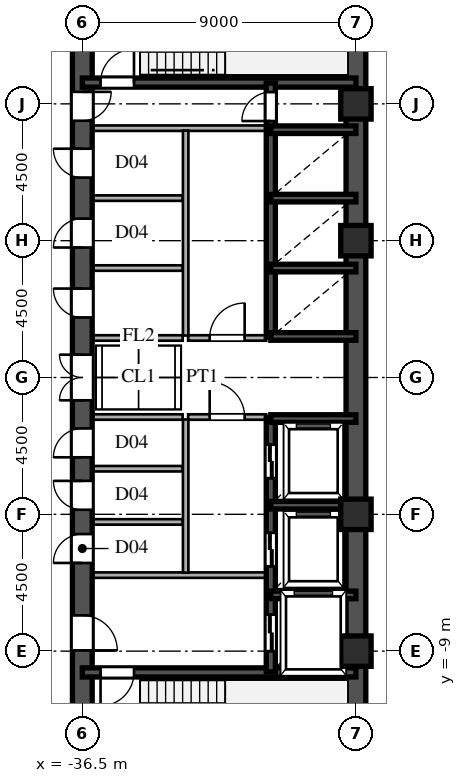
"""IFC4 building model, lengths in metres.
Left out: names, types, materials, properties, quantities, classifications, styles, units other than length and angle.
Written with IfcOpenShell. Run it as: python <this file> out.ifc"""

import sys

from ifc_helpers import new_model, si_unit, direction, frame, frame_2d, origin, origin_2d, place, context, subcontext, project, spatial, rectangle, hollow_rectangle, extrude, source, transform, mapped, element, fill, save


model = new_model("IFC4")
c1 = context("Model", 3, precision=1e-05, world=origin(), true_north=direction((0.0, 1.0)))
c2 = subcontext(c1, "Body", "Model", "MODEL_VIEW")
j1 = project(units=[si_unit("LENGTHUNIT", "METRE"), si_unit("PLANEANGLEUNIT", "RADIAN")], contexts=[c1])
p1 = place(None, origin())
s1 = spatial("IfcSite", under=j1, at=p1, CompositionType="ELEMENT")
p2 = place(p1, origin())
s2 = spatial("IfcBuilding", under=s1, at=p2, CompositionType="ELEMENT")
p3 = place(p2, frame((0.0, 0.0, 103.2)))
s3 = spatial("IfcBuildingStorey", under=s2, at=p3, CompositionType="ELEMENT", Elevation=103.2)
m1 = source(origin(), c2, "Body", "SweptSolid", [
    extrude(hollow_rectangle(XDim=1.0, YDim=1.0, WallThickness=0.042, at=origin_2d()), origin(), (0.0, 0.0, 1.0), 3.6),
])
for number, where, z_axis, x_axis in (
    (1, (-27.5, -9.0, 0.0), (0.0, 0.0, 1.0), (1.0, 0.0, 0.0)),
    (2, (-27.5, -4.5, 0.0), (0.0, 0.0, 1.0), (1.0, 0.0, 0.0)),
    (3, (-27.5, 4.5, 0.0), (0.0, 0.0, 1.0), (1.0, 0.0, 0.0)),
    (4, (-27.5, 9.0, 0.0), (0.0, 0.0, 1.0), (1.0, 0.0, 0.0)),
):
    element("IfcColumn", number, at=place(p3, frame(where, z_axis=z_axis, x_axis=x_axis)), inside=s3, PredefinedType="COLUMN", context=c2, shape_type="MappedRepresentation", body=[
        mapped(m1, transform((0.0, 0.0, 0.0), scale=1.0)),
    ])
for number, where, z_axis, x_axis in (
    (5, (-27.5, -13.5, 0.0), (0.0, 0.0, 1.0), (0.0, 1.0, 0.0)),
    (6, (-27.5, 1.3, 0.0), (0.0, 0.0, 1.0), (0.0, 1.0, 0.0)),
):
    element("IfcWall", number, at=place(p3, frame(where, z_axis=z_axis, x_axis=x_axis)), inside=s3, PredefinedType="SHEAR", context=c2, shape_type="SweptSolid", body=[
        extrude(rectangle(XDim=12.2, YDim=0.65, at=frame_2d((6.1, 0.0))), origin(), (0.0, 0.0, 1.0), 3.38),
    ])
p4 = place(p3, frame((-27.5, -1.3, 0.0), z_axis=(0.0, 0.0, 1.0), x_axis=(0.0, 1.0, 0.0)))
e7 = element("IfcWall", 7, at=p4, inside=s3, PredefinedType="SHEAR", context=c2, shape_type="SweptSolid", body=[
    extrude(rectangle(XDim=2.6, YDim=0.65, at=frame_2d((1.3, 0.0))), origin(), (0.0, 0.0, 1.0), 3.38),
])
p5 = place(p3, frame((-36.5, -13.65, 0.0), z_axis=(0.0, 0.0, 1.0), x_axis=(0.0, 1.0, 0.0)))
e8 = element("IfcWall", 8, at=p5, inside=s3, PredefinedType="SHEAR", context=c2, shape_type="SweptSolid", body=[
    extrude(rectangle(XDim=7.15, YDim=0.65, at=frame_2d((3.575, 0.0))), origin(), (0.0, 0.0, 1.0), 3.38),
])
p6 = place(p5, frame((4.675, 0.0, 0.0)))
e9 = element("IfcOpeningElement", 9, at=p6, cuts=e8, PredefinedType="OPENING", context=c2, shape_type="SweptSolid", body=[
    extrude(rectangle(XDim=1.15, YDim=2.2, at=frame_2d((0.575, 1.1))), frame((0.0, 0.335, 0.0), z_axis=(0.0, -1.0, 0.0), x_axis=(1.0, 0.0, 0.0)), (0.0, 0.0, 1.0), 0.67),
])
p7 = place(p3, frame((-36.5, -1.3, 0.0), z_axis=(0.0, 0.0, 1.0), x_axis=(0.0, 1.0, 0.0)))
e10 = element("IfcWall", 10, at=p7, inside=s3, PredefinedType="SHEAR", context=c2, shape_type="SweptSolid", body=[
    extrude(rectangle(XDim=2.6, YDim=0.65, at=frame_2d((1.3, 0.0))), origin(), (0.0, 0.0, 1.0), 3.38),
])
p8 = place(p7, frame((0.55, 0.0, 0.0)))
e11 = element("IfcOpeningElement", 11, at=p8, cuts=e10, PredefinedType="OPENING", context=c2, shape_type="SweptSolid", body=[
    extrude(rectangle(XDim=1.5, YDim=2.3, at=frame_2d((0.75, 1.15))), frame((0.0, 0.335, 0.0), z_axis=(0.0, -1.0, 0.0), x_axis=(1.0, 0.0, 0.0)), (0.0, 0.0, 1.0), 0.67),
])
p9 = place(p3, frame((-36.5, 8.2, 0.0), z_axis=(0.0, 0.0, 1.0), x_axis=(0.0, 1.0, 0.0)))
e12 = element("IfcWall", 12, at=p9, inside=s3, PredefinedType="SHEAR", context=c2, shape_type="SweptSolid", body=[
    extrude(rectangle(XDim=5.45, YDim=0.65, at=frame_2d((2.725, 0.0))), origin(), (0.0, 0.0, 1.0), 3.38),
])
p10 = place(p9, frame((0.245, 0.0, 0.0)))
e13 = element("IfcOpeningElement", 13, at=p10, cuts=e12, PredefinedType="OPENING", context=c2, shape_type="SweptSolid", body=[
    extrude(rectangle(XDim=0.95, YDim=2.15, at=frame_2d((0.475, 1.075))), frame((0.0, 0.335, 0.0), z_axis=(0.0, -1.0, 0.0), x_axis=(1.0, 0.0, 0.0)), (0.0, 0.0, 1.0), 0.67),
])
p11 = place(p3, frame((-36.5, -6.5, 0.0), z_axis=(0.0, 0.0, 1.0), x_axis=(0.0, 1.0, 0.0)))
e14 = element("IfcWall", 14, at=p11, inside=s3, PredefinedType="SHEAR", context=c2, shape_type="SweptSolid", body=[
    extrude(rectangle(XDim=1.75, YDim=0.65, at=frame_2d((0.875, 0.0))), origin(), (0.0, 0.0, 1.0), 3.38),
])
p12 = place(p11, frame((0.4, 0.0, 0.0)))
e15 = element("IfcOpeningElement", 15, at=p12, cuts=e14, PredefinedType="OPENING", context=c2, shape_type="SweptSolid", body=[
    extrude(rectangle(XDim=0.95, YDim=2.15, at=frame_2d((0.475, 1.075))), frame((0.0, 0.335, 0.0), z_axis=(0.0, -1.0, 0.0), x_axis=(1.0, 0.0, 0.0)), (0.0, 0.0, 1.0), 0.67),
])
p13 = place(p3, frame((-36.5, -4.75, 0.0), z_axis=(0.0, 0.0, 1.0), x_axis=(0.0, 1.0, 0.0)))
e16 = element("IfcWall", 16, at=p13, inside=s3, PredefinedType="SHEAR", context=c2, shape_type="SweptSolid", body=[
    extrude(rectangle(XDim=1.75, YDim=0.65, at=frame_2d((0.875, 0.0))), origin(), (0.0, 0.0, 1.0), 3.38),
])
p14 = place(p13, frame((0.4, 0.0, 0.0)))
e17 = element("IfcOpeningElement", 17, at=p14, cuts=e16, PredefinedType="OPENING", context=c2, shape_type="SweptSolid", body=[
    extrude(rectangle(XDim=0.95, YDim=2.15, at=frame_2d((0.475, 1.075))), frame((0.0, 0.335, 0.0), z_axis=(0.0, -1.0, 0.0), x_axis=(1.0, 0.0, 0.0)), (0.0, 0.0, 1.0), 0.67),
])
p15 = place(p3, frame((-36.5, -3.0, 0.0), z_axis=(0.0, 0.0, 1.0), x_axis=(0.0, 1.0, 0.0)))
e18 = element("IfcWall", 18, at=p15, inside=s3, PredefinedType="SHEAR", context=c2, shape_type="SweptSolid", body=[
    extrude(rectangle(XDim=1.7, YDim=0.65, at=frame_2d((0.85, 0.0))), origin(), (0.0, 0.0, 1.0), 3.38),
])
p16 = place(p15, frame((0.375, 0.0, 0.0)))
e19 = element("IfcOpeningElement", 19, at=p16, cuts=e18, PredefinedType="OPENING", context=c2, shape_type="SweptSolid", body=[
    extrude(rectangle(XDim=0.95, YDim=2.15, at=frame_2d((0.475, 1.075))), frame((0.0, 0.335, 0.0), z_axis=(0.0, -1.0, 0.0), x_axis=(1.0, 0.0, 0.0)), (0.0, 0.0, 1.0), 0.67),
])
p17 = place(p3, frame((-36.5, 1.3, 0.0), z_axis=(0.0, 0.0, 1.0), x_axis=(0.0, 1.0, 0.0)))
e20 = element("IfcWall", 20, at=p17, inside=s3, PredefinedType="SHEAR", context=c2, shape_type="SweptSolid", body=[
    extrude(rectangle(XDim=2.3, YDim=0.65, at=frame_2d((1.15, 0.0))), origin(), (0.0, 0.0, 1.0), 3.38),
])
p18 = place(p17, frame((0.675, 0.0, 0.0)))
e21 = element("IfcOpeningElement", 21, at=p18, cuts=e20, PredefinedType="OPENING", context=c2, shape_type="SweptSolid", body=[
    extrude(rectangle(XDim=0.95, YDim=2.15, at=frame_2d((0.475, 1.075))), frame((0.0, 0.335, 0.0), z_axis=(0.0, -1.0, 0.0), x_axis=(1.0, 0.0, 0.0)), (0.0, 0.0, 1.0), 0.67),
])
p19 = place(p3, frame((-36.5, 3.6, 0.0), z_axis=(0.0, 0.0, 1.0), x_axis=(0.0, 1.0, 0.0)))
e22 = element("IfcWall", 22, at=p19, inside=s3, PredefinedType="SHEAR", context=c2, shape_type="SweptSolid", body=[
    extrude(rectangle(XDim=2.3, YDim=0.65, at=frame_2d((1.15, 0.0))), origin(), (0.0, 0.0, 1.0), 3.38),
])
p20 = place(p19, frame((0.675, 0.0, 0.0)))
e23 = element("IfcOpeningElement", 23, at=p20, cuts=e22, PredefinedType="OPENING", context=c2, shape_type="SweptSolid", body=[
    extrude(rectangle(XDim=0.95, YDim=2.15, at=frame_2d((0.475, 1.075))), frame((0.0, 0.335, 0.0), z_axis=(0.0, -1.0, 0.0), x_axis=(1.0, 0.0, 0.0)), (0.0, 0.0, 1.0), 0.67),
])
p21 = place(p3, frame((-36.5, 5.9, 0.0), z_axis=(0.0, 0.0, 1.0), x_axis=(0.0, 1.0, 0.0)))
e24 = element("IfcWall", 24, at=p21, inside=s3, PredefinedType="SHEAR", context=c2, shape_type="SweptSolid", body=[
    extrude(rectangle(XDim=2.3, YDim=0.65, at=frame_2d((1.15, 0.0))), origin(), (0.0, 0.0, 1.0), 3.38),
])
p22 = place(p21, frame((0.675, 0.0, 0.0)))
e25 = element("IfcOpeningElement", 25, at=p22, cuts=e24, PredefinedType="OPENING", context=c2, shape_type="SweptSolid", body=[
    extrude(rectangle(XDim=0.95, YDim=2.15, at=frame_2d((0.475, 1.075))), frame((0.0, 0.335, 0.0), z_axis=(0.0, -1.0, 0.0), x_axis=(1.0, 0.0, 0.0)), (0.0, 0.0, 1.0), 0.67),
])
p23 = place(p3, frame((-36.5, -9.7, 0.0), z_axis=(0.0, 0.0, 1.0), x_axis=(1.0, 0.0, 0.0)))
e26 = element("IfcWall", 26, at=p23, inside=s3, PredefinedType="SHEAR", context=c2, shape_type="SweptSolid", body=[
    extrude(rectangle(XDim=9.0, YDim=0.3, at=frame_2d((4.5, 0.0))), origin(), (0.0, 0.0, 1.0), 3.38),
])
p24 = place(p23, frame((0.6, 0.0, 0.0)))
e27 = element("IfcOpeningElement", 27, at=p24, cuts=e26, PredefinedType="OPENING", context=c2, shape_type="SweptSolid", body=[
    extrude(rectangle(XDim=1.1, YDim=2.2, at=frame_2d((0.55, 1.1))), frame((0.0, 0.16, 0.0), z_axis=(0.0, -1.0, 0.0), x_axis=(1.0, 0.0, 0.0)), (0.0, 0.0, 1.0), 0.32),
])
p25 = place(p3, frame((-36.5, 9.7, 0.0), z_axis=(0.0, 0.0, 1.0), x_axis=(1.0, 0.0, 0.0)))
e28 = element("IfcWall", 28, at=p25, inside=s3, PredefinedType="SHEAR", context=c2, shape_type="SweptSolid", body=[
    extrude(rectangle(XDim=9.0, YDim=0.3, at=frame_2d((4.5, 0.0))), origin(), (0.0, 0.0, 1.0), 3.38),
])
p26 = place(p25, frame((0.6, 0.0, 0.0)))
e29 = element("IfcOpeningElement", 29, at=p26, cuts=e28, PredefinedType="OPENING", context=c2, shape_type="SweptSolid", body=[
    extrude(rectangle(XDim=1.1, YDim=2.2, at=frame_2d((0.55, 1.1))), frame((0.0, 0.16, 0.0), z_axis=(0.0, -1.0, 0.0), x_axis=(1.0, 0.0, 0.0)), (0.0, 0.0, 1.0), 0.32),
])
for number, where, z_axis, x_axis in (
    (30, (-30.3, -7.15, 0.0), (0.0, 0.0, 1.0), (1.0, 0.0, 0.0)),
    (31, (-30.3, -4.2, 0.0), (0.0, 0.0, 1.0), (1.0, 0.0, 0.0)),
    (32, (-30.3, -1.35, 0.0), (0.0, 0.0, 1.0), (1.0, 0.0, 0.0)),
    (33, (-30.3, 1.35, 0.0), (0.0, 0.0, 1.0), (1.0, 0.0, 0.0)),
    (34, (-30.3, 3.6, 0.0), (0.0, 0.0, 1.0), (1.0, 0.0, 0.0)),
    (35, (-30.3, 5.9, 0.0), (0.0, 0.0, 1.0), (1.0, 0.0, 0.0)),
    (36, (-30.3, 8.15, 0.0), (0.0, 0.0, 1.0), (1.0, 0.0, 0.0)),
):
    element("IfcWall", number, at=place(p3, frame(where, z_axis=z_axis, x_axis=x_axis)), inside=s3, PredefinedType="SHEAR", context=c2, shape_type="SweptSolid", body=[
        extrude(rectangle(XDim=2.8, YDim=0.25, at=frame_2d((1.4, 0.0))), origin(), (0.0, 0.0, 1.0), 3.38),
    ])
p27 = place(p3, frame((-30.3, -9.68, 0.0), z_axis=(0.0, 0.0, 1.0), x_axis=(0.0, 1.0, 0.0)))
e37 = element("IfcWall", 37, at=p27, inside=s3, PredefinedType="SHEAR", context=c2, shape_type="SweptSolid", body=[
    extrude(rectangle(XDim=2.56, YDim=0.3, at=frame_2d((1.28, 0.0))), origin(), (0.0, 0.0, 1.0), 3.38),
])
p28 = place(p27, frame((0.68, 0.0, 0.0)))
e38 = element("IfcOpeningElement", 38, at=p28, cuts=e37, PredefinedType="OPENING", context=c2, shape_type="SweptSolid", body=[
    extrude(rectangle(XDim=1.2, YDim=2.25, at=frame_2d((0.6, 1.125))), frame((0.0, 0.16, 0.0), z_axis=(0.0, -1.0, 0.0), x_axis=(1.0, 0.0, 0.0)), (0.0, 0.0, 1.0), 0.32),
])
p29 = place(p3, frame((-30.3, -7.12, 0.0), z_axis=(0.0, 0.0, 1.0), x_axis=(0.0, 1.0, 0.0)))
e39 = element("IfcWall", 39, at=p29, inside=s3, PredefinedType="SHEAR", context=c2, shape_type="SweptSolid", body=[
    extrude(rectangle(XDim=2.92, YDim=0.3, at=frame_2d((1.46, 0.0))), origin(), (0.0, 0.0, 1.0), 3.38),
])
p30 = place(p29, frame((0.91, 0.0, 0.0)))
e40 = element("IfcOpeningElement", 40, at=p30, cuts=e39, PredefinedType="OPENING", context=c2, shape_type="SweptSolid", body=[
    extrude(rectangle(XDim=1.1, YDim=2.2, at=frame_2d((0.55, 1.1))), frame((0.0, 0.16, 0.0), z_axis=(0.0, -1.0, 0.0), x_axis=(1.0, 0.0, 0.0)), (0.0, 0.0, 1.0), 0.32),
])
p31 = place(p3, frame((-30.3, -4.2, 0.0), z_axis=(0.0, 0.0, 1.0), x_axis=(0.0, 1.0, 0.0)))
e41 = element("IfcWall", 41, at=p31, inside=s3, PredefinedType="SHEAR", context=c2, shape_type="SweptSolid", body=[
    extrude(rectangle(XDim=2.88, YDim=0.3, at=frame_2d((1.44, 0.0))), origin(), (0.0, 0.0, 1.0), 3.38),
])
p32 = place(p31, frame((0.89, 0.0, 0.0)))
e42 = element("IfcOpeningElement", 42, at=p32, cuts=e41, PredefinedType="OPENING", context=c2, shape_type="SweptSolid", body=[
    extrude(rectangle(XDim=1.1, YDim=2.2, at=frame_2d((0.55, 1.1))), frame((0.0, 0.16, 0.0), z_axis=(0.0, -1.0, 0.0), x_axis=(1.0, 0.0, 0.0)), (0.0, 0.0, 1.0), 0.32),
])
p33 = place(p3, frame((-30.3, 1.32, 0.0), z_axis=(0.0, 0.0, 1.0), x_axis=(0.0, 1.0, 0.0)))
e43 = element("IfcWall", 43, at=p33, inside=s3, PredefinedType="SHEAR", context=c2, shape_type="SweptSolid", body=[
    extrude(rectangle(XDim=2.28, YDim=0.3, at=frame_2d((1.14, 0.0))), origin(), (0.0, 0.0, 1.0), 3.38),
])
p34 = place(p3, frame((-30.3, 3.6, 0.0), z_axis=(0.0, 0.0, 1.0), x_axis=(0.0, 1.0, 0.0)))
e44 = element("IfcWall", 44, at=p34, inside=s3, PredefinedType="SHEAR", context=c2, shape_type="SweptSolid", body=[
    extrude(rectangle(XDim=2.3, YDim=0.3, at=frame_2d((1.15, 0.0))), origin(), (0.0, 0.0, 1.0), 3.38),
])
p35 = place(p3, frame((-30.3, 5.9, 0.0), z_axis=(0.0, 0.0, 1.0), x_axis=(0.0, 1.0, 0.0)))
e45 = element("IfcWall", 45, at=p35, inside=s3, PredefinedType="SHEAR", context=c2, shape_type="SweptSolid", body=[
    extrude(rectangle(XDim=2.25, YDim=0.3, at=frame_2d((1.125, 0.0))), origin(), (0.0, 0.0, 1.0), 3.38),
])
p36 = place(p3, frame((-30.3, 8.15, 0.0), z_axis=(0.0, 0.0, 1.0), x_axis=(0.0, 1.0, 0.0)))
e46 = element("IfcWall", 46, at=p36, inside=s3, PredefinedType="SHEAR", context=c2, shape_type="SweptSolid", body=[
    extrude(rectangle(XDim=1.53, YDim=0.3, at=frame_2d((0.765, 0.0))), origin(), (0.0, 0.0, 1.0), 3.38),
])
p37 = place(p36, frame((0.285, 0.0, 0.0)))
e47 = element("IfcOpeningElement", 47, at=p37, cuts=e46, PredefinedType="OPENING", context=c2, shape_type="SweptSolid", body=[
    extrude(rectangle(XDim=0.95, YDim=2.15, at=frame_2d((0.475, 1.075))), frame((0.0, 0.16, 0.0), z_axis=(0.0, -1.0, 0.0), x_axis=(1.0, 0.0, 0.0)), (0.0, 0.0, 1.0), 0.32),
])
for number, where, z_axis, x_axis in (
    (48, (-36.15, -6.5, 0.0), (0.0, 0.0, 1.0), (1.0, 0.0, 0.0)),
    (49, (-36.15, 8.2, 0.0), (0.0, 0.0, 1.0), (1.0, 0.0, 0.0)),
):
    element("IfcWall", number, at=place(p3, frame(where, z_axis=z_axis, x_axis=x_axis)), inside=s3, PredefinedType="PARTITIONING", context=c2, shape_type="SweptSolid", body=[
        extrude(rectangle(XDim=5.7, YDim=0.18, at=frame_2d((2.85, 0.0))), origin(), (0.0, 0.0, 1.0), 3.38),
    ])
p38 = place(p3, frame((-33.1, -6.42, 0.0), z_axis=(0.0, 0.0, 1.0), x_axis=(0.0, 1.0, 0.0)))
e50 = element("IfcWall", 50, at=p38, inside=s3, PredefinedType="PARTITIONING", context=c2, shape_type="SweptSolid", body=[
    extrude(rectangle(XDim=5.04, YDim=0.18, at=frame_2d((2.52, 0.0))), origin(), (0.0, 0.0, 1.0), 3.38),
])
p39 = place(p3, frame((-33.1, 1.38, 0.0), z_axis=(0.0, 0.0, 1.0), x_axis=(0.0, 1.0, 0.0)))
e51 = element("IfcWall", 51, at=p39, inside=s3, PredefinedType="PARTITIONING", context=c2, shape_type="SweptSolid", body=[
    extrude(rectangle(XDim=6.74, YDim=0.18, at=frame_2d((3.37, 0.0))), origin(), (0.0, 0.0, 1.0), 3.38),
])
p40 = place(p3, frame((-33.02, -1.3, 0.0), z_axis=(0.0, 0.0, 1.0), x_axis=(1.0, 0.0, 0.0)))
e52 = element("IfcWall", 52, at=p40, inside=s3, PredefinedType="PARTITIONING", context=c2, shape_type="SweptSolid", body=[
    extrude(rectangle(XDim=2.57, YDim=0.18, at=frame_2d((1.285, 0.0))), origin(), (0.0, 0.0, 1.0), 3.38),
])
p41 = place(p40, frame((0.71, 0.0, 0.0)))
e53 = element("IfcOpeningElement", 53, at=p41, cuts=e52, PredefinedType="OPENING", context=c2, shape_type="SweptSolid", body=[
    extrude(rectangle(XDim=1.15, YDim=2.2, at=frame_2d((0.575, 1.1))), frame((0.0, 0.1, 0.0), z_axis=(0.0, -1.0, 0.0), x_axis=(1.0, 0.0, 0.0)), (0.0, 0.0, 1.0), 0.2),
])
p42 = place(p3, frame((-33.02, 1.3, 0.0), z_axis=(0.0, 0.0, 1.0), x_axis=(1.0, 0.0, 0.0)))
e54 = element("IfcWall", 54, at=p42, inside=s3, PredefinedType="PARTITIONING", context=c2, shape_type="SweptSolid", body=[
    extrude(rectangle(XDim=2.57, YDim=0.18, at=frame_2d((1.285, 0.0))), origin(), (0.0, 0.0, 1.0), 3.38),
])
p43 = place(p42, frame((0.71, 0.0, 0.0)))
e55 = element("IfcOpeningElement", 55, at=p43, cuts=e54, PredefinedType="OPENING", context=c2, shape_type="SweptSolid", body=[
    extrude(rectangle(XDim=1.15, YDim=2.2, at=frame_2d((0.575, 1.1))), frame((0.0, 0.1, 0.0), z_axis=(0.0, -1.0, 0.0), x_axis=(1.0, 0.0, 0.0)), (0.0, 0.0, 1.0), 0.2),
])
for number, where, z_axis, x_axis in (
    (56, (-36.15, -1.3, 0.0), (0.0, 0.0, 1.0), (1.0, 0.0, 0.0)),
    (57, (-36.15, 1.3, 0.0), (0.0, 0.0, 1.0), (1.0, 0.0, 0.0)),
    (58, (-36.15, -4.75, 0.0), (0.0, 0.0, 1.0), (1.0, 0.0, 0.0)),
    (59, (-36.15, -3.0, 0.0), (0.0, 0.0, 1.0), (1.0, 0.0, 0.0)),
    (60, (-36.15, 3.6, 0.0), (0.0, 0.0, 1.0), (1.0, 0.0, 0.0)),
    (61, (-36.15, 5.9, 0.0), (0.0, 0.0, 1.0), (1.0, 0.0, 0.0)),
):
    element("IfcWall", number, at=place(p3, frame(where, z_axis=z_axis, x_axis=x_axis)), inside=s3, PredefinedType="PARTITIONING", context=c2, shape_type="SweptSolid", body=[
        extrude(rectangle(XDim=2.95, YDim=0.18, at=frame_2d((1.475, 0.0))), origin(), (0.0, 0.0, 1.0), 3.38),
    ])
m2 = source(origin(), c2, "Body", "SweptSolid", [
    extrude(rectangle(XDim=1.15, YDim=2.2, at=frame_2d((0.575, 1.1))), frame((0.0, 0.025, 0.0), z_axis=(0.0, -1.0, 0.0), x_axis=(1.0, 0.0, 0.0)), (0.0, 0.0, 1.0), 0.05),
])
p44 = place(p6, frame((1.15, 0.0, 0.0), z_axis=(0.0, 0.0, 1.0), x_axis=(-1.0, 0.0, 0.0)))
e62 = element("IfcDoor", 62, at=p44, inside=s3, OperationType="SINGLE_SWING_LEFT", PredefinedType="DOOR", context=c2, shape_type="MappedRepresentation", body=[
    mapped(m2, transform((0.0, 0.0, 0.0), scale=1.0)),
])
fill(e9, e62)
m3 = source(origin(), c2, "Body", "SweptSolid", [
    extrude(rectangle(XDim=1.5, YDim=2.3, at=frame_2d((0.75, 1.15))), frame((0.0, 0.025, 0.0), z_axis=(0.0, -1.0, 0.0), x_axis=(1.0, 0.0, 0.0)), (0.0, 0.0, 1.0), 0.05),
])
p45 = place(p8, origin())
e63 = element("IfcDoor", 63, at=p45, inside=s3, OperationType="DOUBLE_SWING_LEFT", PredefinedType="DOOR", context=c2, shape_type="MappedRepresentation", body=[
    mapped(m3, transform((0.0, 0.0, 0.0), scale=1.0)),
])
fill(e11, e63)
m4 = source(origin(), c2, "Body", "SweptSolid", [
    extrude(rectangle(XDim=0.95, YDim=2.15, at=frame_2d((0.475, 1.075))), frame((0.0, 0.025, 0.0), z_axis=(0.0, -1.0, 0.0), x_axis=(1.0, 0.0, 0.0)), (0.0, 0.0, 1.0), 0.05),
])
p46 = place(p10, frame((0.95, 0.0, 0.0), z_axis=(0.0, 0.0, 1.0), x_axis=(-1.0, 0.0, 0.0)))
e64 = element("IfcDoor", 64, at=p46, inside=s3, OperationType="SINGLE_SWING_RIGHT", PredefinedType="DOOR", context=c2, shape_type="MappedRepresentation", body=[
    mapped(m4, transform((0.0, 0.0, 0.0), scale=1.0)),
])
fill(e13, e64)
p47 = place(p12, origin())
e65 = element("IfcDoor", 65, at=p47, inside=s3, OperationType="SINGLE_SWING_LEFT", PredefinedType="DOOR", context=c2, shape_type="MappedRepresentation", body=[
    mapped(m4, transform((0.0, 0.0, 0.0), scale=1.0)),
])
fill(e15, e65)
p48 = place(p14, origin())
e66 = element("IfcDoor", 66, at=p48, inside=s3, OperationType="SINGLE_SWING_RIGHT", PredefinedType="DOOR", context=c2, shape_type="MappedRepresentation", body=[
    mapped(m4, transform((0.0, 0.0, 0.0), scale=1.0)),
])
fill(e17, e66)
p49 = place(p16, origin())
e67 = element("IfcDoor", 67, at=p49, inside=s3, OperationType="SINGLE_SWING_LEFT", PredefinedType="DOOR", context=c2, shape_type="MappedRepresentation", body=[
    mapped(m4, transform((0.0, 0.0, 0.0), scale=1.0)),
])
fill(e19, e67)
p50 = place(p18, origin())
e68 = element("IfcDoor", 68, at=p50, inside=s3, OperationType="SINGLE_SWING_RIGHT", PredefinedType="DOOR", context=c2, shape_type="MappedRepresentation", body=[
    mapped(m4, transform((0.0, 0.0, 0.0), scale=1.0)),
])
fill(e21, e68)
p51 = place(p20, origin())
e69 = element("IfcDoor", 69, at=p51, inside=s3, OperationType="SINGLE_SWING_LEFT", PredefinedType="DOOR", context=c2, shape_type="MappedRepresentation", body=[
    mapped(m4, transform((0.0, 0.0, 0.0), scale=1.0)),
])
fill(e23, e69)
p52 = place(p22, origin())
e70 = element("IfcDoor", 70, at=p52, inside=s3, OperationType="SINGLE_SWING_RIGHT", PredefinedType="DOOR", context=c2, shape_type="MappedRepresentation", body=[
    mapped(m4, transform((0.0, 0.0, 0.0), scale=1.0)),
])
fill(e25, e70)
m5 = source(origin(), c2, "Body", "SweptSolid", [
    extrude(rectangle(XDim=1.1, YDim=2.2, at=frame_2d((0.55, 1.1))), frame((0.0, 0.025, 0.0), z_axis=(0.0, -1.0, 0.0), x_axis=(1.0, 0.0, 0.0)), (0.0, 0.0, 1.0), 0.05),
])
p53 = place(p24, frame((1.1, 0.0, 0.0), z_axis=(0.0, 0.0, 1.0), x_axis=(-1.0, 0.0, 0.0)))
e71 = element("IfcDoor", 71, at=p53, inside=s3, OperationType="SINGLE_SWING_LEFT", PredefinedType="DOOR", context=c2, shape_type="MappedRepresentation", body=[
    mapped(m5, transform((0.0, 0.0, 0.0), scale=1.0)),
])
fill(e27, e71)
p54 = place(p26, origin())
e72 = element("IfcDoor", 72, at=p54, inside=s3, OperationType="SINGLE_SWING_RIGHT", PredefinedType="DOOR", context=c2, shape_type="MappedRepresentation", body=[
    mapped(m5, transform((0.0, 0.0, 0.0), scale=1.0)),
])
fill(e29, e72)
m6 = source(origin(), c2, "Body", "SweptSolid", [
    extrude(rectangle(XDim=1.2, YDim=2.25, at=frame_2d((0.6, 1.125))), frame((0.0, 0.025, 0.0), z_axis=(0.0, -1.0, 0.0), x_axis=(1.0, 0.0, 0.0)), (0.0, 0.0, 1.0), 0.05),
])
p55 = place(p28, origin())
e73 = element("IfcDoor", 73, at=p55, inside=s3, OperationType="DOUBLE_DOOR_SLIDING", PredefinedType="DOOR", context=c2, shape_type="MappedRepresentation", body=[
    mapped(m6, transform((0.0, 0.0, 0.0), scale=1.0)),
])
fill(e38, e73)
m7 = source(origin(), c2, "Body", "SweptSolid", [
    extrude(rectangle(XDim=1.1, YDim=2.2, at=frame_2d((0.55, 1.1))), frame((0.0, 0.025, 0.0), z_axis=(0.0, -1.0, 0.0), x_axis=(1.0, 0.0, 0.0)), (0.0, 0.0, 1.0), 0.05),
])
p56 = place(p30, origin())
e74 = element("IfcDoor", 74, at=p56, inside=s3, OperationType="DOUBLE_DOOR_SLIDING", PredefinedType="DOOR", context=c2, shape_type="MappedRepresentation", body=[
    mapped(m7, transform((0.0, 0.0, 0.0), scale=1.0)),
])
fill(e40, e74)
p57 = place(p32, origin())
e75 = element("IfcDoor", 75, at=p57, inside=s3, OperationType="DOUBLE_DOOR_SLIDING", PredefinedType="DOOR", context=c2, shape_type="MappedRepresentation", body=[
    mapped(m7, transform((0.0, 0.0, 0.0), scale=1.0)),
])
fill(e42, e75)
p58 = place(p37, origin())
e76 = element("IfcDoor", 76, at=p58, inside=s3, OperationType="SINGLE_SWING_LEFT", PredefinedType="DOOR", context=c2, shape_type="MappedRepresentation", body=[
    mapped(m4, transform((0.0, 0.0, 0.0), scale=1.0)),
])
fill(e47, e76)
p59 = place(p41, origin())
e77 = element("IfcDoor", 77, at=p59, inside=s3, OperationType="SINGLE_SWING_LEFT", PredefinedType="DOOR", context=c2, shape_type="MappedRepresentation", body=[
    mapped(m2, transform((0.0, 0.0, 0.0), scale=1.0)),
])
fill(e53, e77)
p60 = place(p43, origin())
e78 = element("IfcDoor", 78, at=p60, inside=s3, OperationType="SINGLE_SWING_RIGHT", PredefinedType="DOOR", context=c2, shape_type="MappedRepresentation", body=[
    mapped(m2, transform((0.0, 0.0, 0.0), scale=1.0)),
])
fill(e55, e78)
save(model, sys.argv[1])
